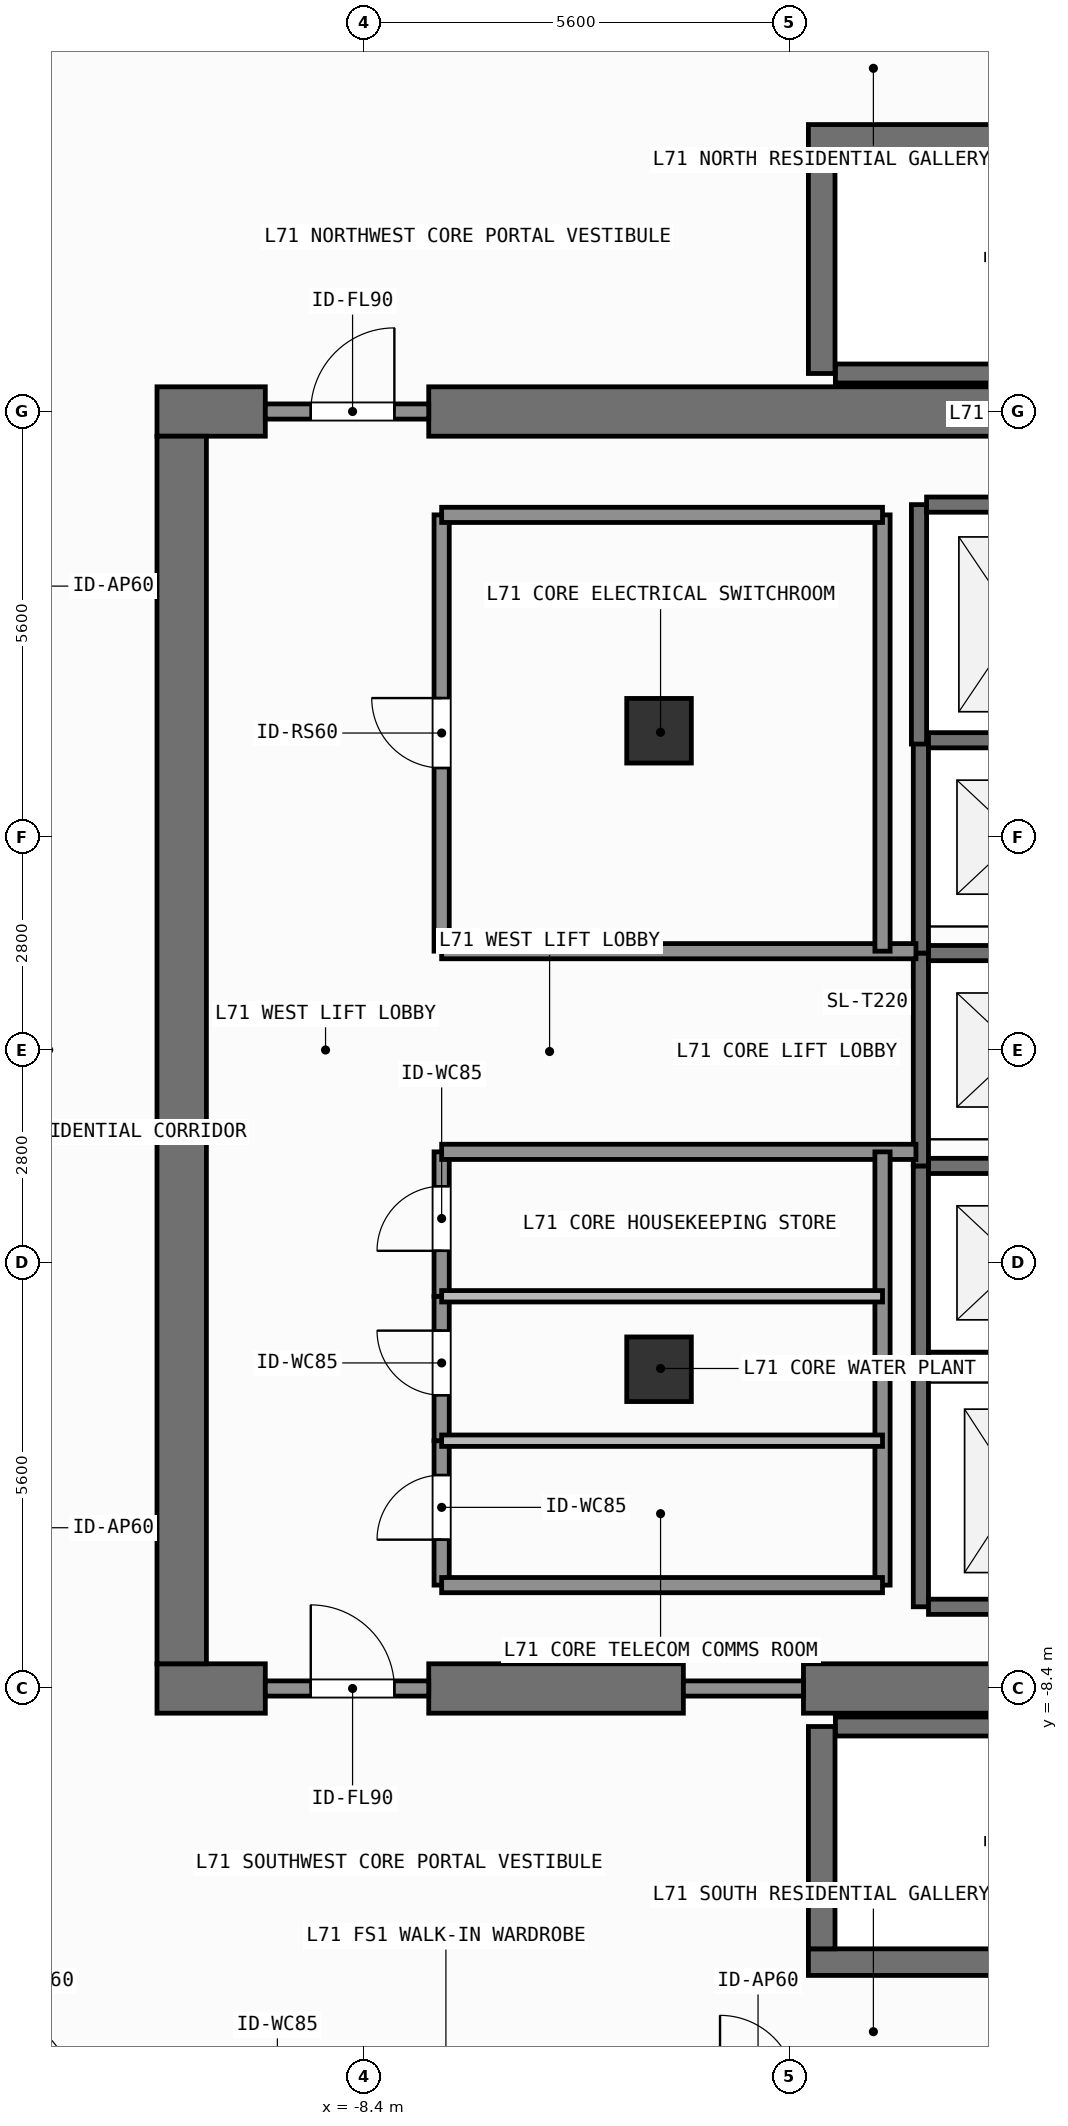
"""IFC4 building model, lengths in metres.
Left out: names, types, materials, properties, quantities, classifications, styles, units other than length and angle.
Written with IfcOpenShell. Run it as: python <this file> out.ifc"""

import sys

from ifc_helpers import new_model, si_unit, direction, frame, frame_2d, origin, origin_2d, place, context, subcontext, project, spatial, rectangle, extrude, element, fill, save


model = new_model("IFC4")
c1 = context("Model", 3, precision=1e-05, world=origin(), true_north=direction((0.0, 1.0)))
c2 = subcontext(c1, "Body", "Model", "MODEL_VIEW")
j1 = project(units=[si_unit("LENGTHUNIT", "METRE"), si_unit("PLANEANGLEUNIT", "RADIAN")], contexts=[c1])
p1 = place(None, origin())
s1 = spatial("IfcSite", under=j1, at=p1, CompositionType="ELEMENT")
p2 = place(p1, origin())
s2 = spatial("IfcBuilding", under=s1, at=p2, CompositionType="ELEMENT")
p3 = place(p2, frame((0.0, 0.0, 289.8)))
s3 = spatial("IfcBuildingStorey", under=s2, at=p3, CompositionType="ELEMENT", Elevation=289.8)
p4 = place(p3, frame((-11.125, -8.4, 0.0), z_axis=(0.0, 0.0, 1.0), x_axis=(1.0, 0.0, 0.0)))
e1 = element("IfcWall", 1, at=p4, inside=s3, PredefinedType="SHEAR", context=c2, shape_type="SweptSolid", body=[
    extrude(rectangle(XDim=1.425, YDim=0.65, at=frame_2d((0.712, 0.0))), origin(), (0.0, 0.0, 1.0), 3.9),
])
p5 = place(p3, frame((-7.55, -8.4, 0.0), z_axis=(0.0, 0.0, 1.0), x_axis=(1.0, 0.0, 0.0)))
e2 = element("IfcWall", 2, at=p5, inside=s3, PredefinedType="SHEAR", context=c2, shape_type="SweptSolid", body=[
    extrude(rectangle(XDim=3.35, YDim=0.65, at=frame_2d((1.675, 0.0))), origin(), (0.0, 0.0, 1.0), 3.9),
])
p6 = place(p3, frame((-2.62, -8.4, 0.0), z_axis=(0.0, 0.0, 1.0), x_axis=(1.0, 0.0, 0.0)))
e3 = element("IfcWall", 3, at=p6, inside=s3, PredefinedType="SHEAR", context=c2, shape_type="SweptSolid", body=[
    extrude(rectangle(XDim=7.27, YDim=0.65, at=frame_2d((3.635, 0.0))), origin(), (0.0, 0.0, 1.0), 3.9),
])
p7 = place(p3, frame((-11.125, 8.4, 0.0), z_axis=(0.0, 0.0, 1.0), x_axis=(1.0, 0.0, 0.0)))
e4 = element("IfcWall", 4, at=p7, inside=s3, PredefinedType="SHEAR", context=c2, shape_type="SweptSolid", body=[
    extrude(rectangle(XDim=1.425, YDim=0.65, at=frame_2d((0.712, 0.0))), origin(), (0.0, 0.0, 1.0), 3.9),
])
p8 = place(p3, frame((-7.55, 8.4, 0.0), z_axis=(0.0, 0.0, 1.0), x_axis=(1.0, 0.0, 0.0)))
e5 = element("IfcWall", 5, at=p8, inside=s3, PredefinedType="SHEAR", context=c2, shape_type="SweptSolid", body=[
    extrude(rectangle(XDim=16.275, YDim=0.65, at=frame_2d((8.138, 0.0))), origin(), (0.0, 0.0, 1.0), 3.9),
])
p9 = place(p3, frame((-10.8, -8.075, 0.0), z_axis=(0.0, 0.0, 1.0), x_axis=(0.0, 1.0, 0.0)))
e6 = element("IfcWall", 6, at=p9, inside=s3, PredefinedType="SHEAR", context=c2, shape_type="SweptSolid", body=[
    extrude(rectangle(XDim=16.15, YDim=0.65, at=frame_2d((8.075, 0.0))), origin(), (0.0, 0.0, 1.0), 3.9),
])
p10 = place(p3, frame((-2.555, -12.0, 0.0), z_axis=(0.0, 0.0, 1.0), x_axis=(1.0, 0.0, 0.0)))
e7 = element("IfcWall", 7, at=p10, inside=s3, PredefinedType="SHEAR", context=c2, shape_type="SweptSolid", body=[
    extrude(rectangle(XDim=7.31, YDim=0.35, at=frame_2d((3.655, 0.0))), origin(), (0.0, 0.0, 1.0), 3.9),
])
p11 = place(p3, frame((-2.2, -8.9, 0.0), z_axis=(0.0, 0.0, 1.0), x_axis=(1.0, 0.0, 0.0)))
e8 = element("IfcWall", 8, at=p11, inside=s3, PredefinedType="SHEAR", context=c2, shape_type="SweptSolid", body=[
    extrude(rectangle(XDim=6.6, YDim=0.25, at=frame_2d((3.3, 0.0))), origin(), (0.0, 0.0, 1.0), 3.9),
])
p12 = place(p3, frame((-2.38, -11.825, 0.0), z_axis=(0.0, 0.0, 1.0), x_axis=(0.0, 1.0, 0.0)))
e9 = element("IfcWall", 9, at=p12, inside=s3, PredefinedType="SHEAR", context=c2, shape_type="SweptSolid", body=[
    extrude(rectangle(XDim=2.925, YDim=0.35, at=frame_2d((1.462, 0.0))), origin(), (0.0, 0.0, 1.0), 3.9),
])
p13 = place(p3, frame((-2.555, 12.0, 0.0), z_axis=(0.0, 0.0, 1.0), x_axis=(1.0, 0.0, 0.0)))
e10 = element("IfcWall", 10, at=p13, inside=s3, PredefinedType="SHEAR", context=c2, shape_type="SweptSolid", body=[
    extrude(rectangle(XDim=7.31, YDim=0.35, at=frame_2d((3.655, 0.0))), origin(), (0.0, 0.0, 1.0), 3.9),
])
p14 = place(p3, frame((-2.2, 8.9, 0.0), z_axis=(0.0, 0.0, 1.0), x_axis=(1.0, 0.0, 0.0)))
e11 = element("IfcWall", 11, at=p14, inside=s3, PredefinedType="SHEAR", context=c2, shape_type="SweptSolid", body=[
    extrude(rectangle(XDim=6.6, YDim=0.25, at=frame_2d((3.3, 0.0))), origin(), (0.0, 0.0, 1.0), 3.9),
])
p15 = place(p3, frame((-2.38, 8.9, 0.0), z_axis=(0.0, 0.0, 1.0), x_axis=(0.0, 1.0, 0.0)))
e12 = element("IfcWall", 12, at=p15, inside=s3, PredefinedType="SHEAR", context=c2, shape_type="SweptSolid", body=[
    extrude(rectangle(XDim=2.925, YDim=0.35, at=frame_2d((1.462, 0.0))), origin(), (0.0, 0.0, 1.0), 3.9),
])
for number, where, z_axis, x_axis in (
    (13, (-4.52, -4.2, 0.0), (0.0, 0.0, 1.0), (1.0, 0.0, 0.0)),
    (14, (-4.52, 4.2, 0.0), (0.0, 0.0, 1.0), (1.0, 0.0, 0.0)),
):
    element("IfcColumn", number, at=place(p3, frame(where, z_axis=z_axis, x_axis=x_axis)), inside=s3, PredefinedType="COLUMN", context=c2, shape_type="SweptSolid", body=[
        extrude(rectangle(XDim=0.85, YDim=0.85, at=origin_2d()), origin(), (0.0, 0.0, 1.0), 3.9),
    ])
p16 = place(p3, frame((-1.075, -4.275, 0.0), z_axis=(0.0, 0.0, 1.0), x_axis=(0.0, 1.0, 0.0)))
e15 = element("IfcWall", 15, at=p16, inside=s3, PredefinedType="SHEAR", context=c2, shape_type="SweptSolid", body=[
    extrude(rectangle(XDim=2.75, YDim=0.2, at=frame_2d((1.375, 0.0))), origin(), (0.0, 0.0, 1.0), 3.68),
])
for number, where, z_axis, x_axis in (
    (16, (-0.975, -4.075, 0.0), (0.0, 0.0, 1.0), (1.0, 0.0, 0.0)),
    (17, (-0.975, -1.525, 0.0), (0.0, 0.0, 1.0), (1.0, 0.0, 0.0)),
):
    element("IfcWall", number, at=place(p3, frame(where, z_axis=z_axis, x_axis=x_axis)), inside=s3, PredefinedType="SHEAR", context=c2, shape_type="SweptSolid", body=[
        extrude(rectangle(XDim=2.35, YDim=0.2, at=frame_2d((1.175, 0.0))), origin(), (0.0, 0.0, 1.0), 3.68),
    ])
p17 = place(p3, frame((-1.075, -1.525, 0.0), z_axis=(0.0, 0.0, 1.0), x_axis=(0.0, 1.0, 0.0)))
e18 = element("IfcWall", 18, at=p17, inside=s3, PredefinedType="SHEAR", context=c2, shape_type="SweptSolid", body=[
    extrude(rectangle(XDim=2.8, YDim=0.2, at=frame_2d((1.4, 0.0))), origin(), (0.0, 0.0, 1.0), 3.68),
])
p18 = place(p3, frame((-0.975, 1.275, 0.0), z_axis=(0.0, 0.0, 1.0), x_axis=(1.0, 0.0, 0.0)))
e19 = element("IfcWall", 19, at=p18, inside=s3, PredefinedType="SHEAR", context=c2, shape_type="SweptSolid", body=[
    extrude(rectangle(XDim=2.35, YDim=0.2, at=frame_2d((1.175, 0.0))), origin(), (0.0, 0.0, 1.0), 3.68),
])
p19 = place(p3, frame((-1.075, 1.275, 0.0), z_axis=(0.0, 0.0, 1.0), x_axis=(0.0, 1.0, 0.0)))
e20 = element("IfcWall", 20, at=p19, inside=s3, PredefinedType="SHEAR", context=c2, shape_type="SweptSolid", body=[
    extrude(rectangle(XDim=2.8, YDim=0.2, at=frame_2d((1.4, 0.0))), origin(), (0.0, 0.0, 1.0), 3.68),
])
p20 = place(p3, frame((-0.975, 4.075, 0.0), z_axis=(0.0, 0.0, 1.0), x_axis=(1.0, 0.0, 0.0)))
e21 = element("IfcWall", 21, at=p20, inside=s3, PredefinedType="SHEAR", context=c2, shape_type="SweptSolid", body=[
    extrude(rectangle(XDim=2.35, YDim=0.2, at=frame_2d((1.175, 0.0))), origin(), (0.0, 0.0, 1.0), 3.68),
])
p21 = place(p3, frame((-1.1, 4.025, 0.0), z_axis=(0.0, 0.0, 1.0), x_axis=(0.0, 1.0, 0.0)))
e22 = element("IfcWall", 22, at=p21, inside=s3, PredefinedType="SHEAR", context=c2, shape_type="SweptSolid", body=[
    extrude(rectangle(XDim=3.15, YDim=0.2, at=frame_2d((1.575, 0.0))), origin(), (0.0, 0.0, 1.0), 3.68),
])
p22 = place(p3, frame((-1.0, 7.175, 0.0), z_axis=(0.0, 0.0, 1.0), x_axis=(1.0, 0.0, 0.0)))
e23 = element("IfcWall", 23, at=p22, inside=s3, PredefinedType="SHEAR", context=c2, shape_type="SweptSolid", body=[
    extrude(rectangle(XDim=2.4, YDim=0.2, at=frame_2d((1.2, 0.0))), origin(), (0.0, 0.0, 1.0), 3.68),
])
p23 = place(p3, frame((-1.075, -7.325, 0.0), z_axis=(0.0, 0.0, 1.0), x_axis=(0.0, 1.0, 0.0)))
e24 = element("IfcWall", 24, at=p23, inside=s3, PredefinedType="SHEAR", context=c2, shape_type="SweptSolid", body=[
    extrude(rectangle(XDim=3.05, YDim=0.2, at=frame_2d((1.525, 0.0))), origin(), (0.0, 0.0, 1.0), 3.68),
])
p24 = place(p3, frame((-0.975, -7.325, 0.0), z_axis=(0.0, 0.0, 1.0), x_axis=(1.0, 0.0, 0.0)))
e25 = element("IfcWall", 25, at=p24, inside=s3, PredefinedType="SHEAR", context=c2, shape_type="SweptSolid", body=[
    extrude(rectangle(XDim=2.35, YDim=0.2, at=frame_2d((1.175, 0.0))), origin(), (0.0, 0.0, 1.0), 3.68),
])
p25 = place(p3, frame((-9.7, -8.4, 0.0), z_axis=(0.0, 0.0, 1.0), x_axis=(1.0, 0.0, 0.0)))
e26 = element("IfcWall", 26, at=p25, inside=s3, PredefinedType="SOLIDWALL", context=c2, shape_type="SweptSolid", body=[
    extrude(rectangle(XDim=2.15, YDim=0.2, at=frame_2d((1.075, 0.0))), origin(), (0.0, 0.0, 1.0), 2.92),
])
p26 = place(p25, frame((0.598, 0.0, 0.0)))
e27 = element("IfcOpeningElement", 27, at=p26, cuts=e26, PredefinedType="OPENING", context=c2, shape_type="SweptSolid", body=[
    extrude(rectangle(XDim=1.1, YDim=2.15, at=frame_2d((0.55, 1.075))), frame((0.0, 0.11, 0.0), z_axis=(0.0, -1.0, 0.0), x_axis=(1.0, 0.0, 0.0)), (0.0, 0.0, 1.0), 0.22),
])
p27 = place(p3, frame((-9.7, 8.4, 0.0), z_axis=(0.0, 0.0, 1.0), x_axis=(1.0, 0.0, 0.0)))
e28 = element("IfcWall", 28, at=p27, inside=s3, PredefinedType="SOLIDWALL", context=c2, shape_type="SweptSolid", body=[
    extrude(rectangle(XDim=2.15, YDim=0.2, at=frame_2d((1.075, 0.0))), origin(), (0.0, 0.0, 1.0), 2.92),
])
p28 = place(p27, frame((0.598, 0.0, 0.0)))
e29 = element("IfcOpeningElement", 29, at=p28, cuts=e28, PredefinedType="OPENING", context=c2, shape_type="SweptSolid", body=[
    extrude(rectangle(XDim=1.1, YDim=2.15, at=frame_2d((0.55, 1.075))), frame((0.0, 0.11, 0.0), z_axis=(0.0, -1.0, 0.0), x_axis=(1.0, 0.0, 0.0)), (0.0, 0.0, 1.0), 0.22),
])
p29 = place(p3, frame((-7.38, -7.04, 0.0), z_axis=(0.0, 0.0, 1.0), x_axis=(0.0, 1.0, 0.0)))
e30 = element("IfcWall", 30, at=p29, inside=s3, PredefinedType="SOLIDWALL", context=c2, shape_type="SweptSolid", body=[
    extrude(rectangle(XDim=1.9, YDim=0.2, at=frame_2d((0.95, 0.0))), origin(), (0.0, 0.0, 1.0), 3.68),
])
p30 = place(p29, frame((0.598, 0.0, 0.0)))
e31 = element("IfcOpeningElement", 31, at=p30, cuts=e30, PredefinedType="OPENING", context=c2, shape_type="SweptSolid", body=[
    extrude(rectangle(XDim=0.85, YDim=2.1, at=frame_2d((0.425, 1.05))), frame((0.0, 0.11, 0.0), z_axis=(0.0, -1.0, 0.0), x_axis=(1.0, 0.0, 0.0)), (0.0, 0.0, 1.0), 0.22),
])
p31 = place(p3, frame((-7.38, -5.14, 0.0), z_axis=(0.0, 0.0, 1.0), x_axis=(0.0, 1.0, 0.0)))
e32 = element("IfcWall", 32, at=p31, inside=s3, PredefinedType="SOLIDWALL", context=c2, shape_type="SweptSolid", body=[
    extrude(rectangle(XDim=1.9, YDim=0.2, at=frame_2d((0.95, 0.0))), origin(), (0.0, 0.0, 1.0), 3.68),
])
p32 = place(p31, frame((0.598, 0.0, 0.0)))
e33 = element("IfcOpeningElement", 33, at=p32, cuts=e32, PredefinedType="OPENING", context=c2, shape_type="SweptSolid", body=[
    extrude(rectangle(XDim=0.85, YDim=2.1, at=frame_2d((0.425, 1.05))), frame((0.0, 0.11, 0.0), z_axis=(0.0, -1.0, 0.0), x_axis=(1.0, 0.0, 0.0)), (0.0, 0.0, 1.0), 0.22),
])
p33 = place(p3, frame((-7.38, -3.24, 0.0), z_axis=(0.0, 0.0, 1.0), x_axis=(0.0, 1.0, 0.0)))
e34 = element("IfcWall", 34, at=p33, inside=s3, PredefinedType="SOLIDWALL", context=c2, shape_type="SweptSolid", body=[
    extrude(rectangle(XDim=1.9, YDim=0.2, at=frame_2d((0.95, 0.0))), origin(), (0.0, 0.0, 1.0), 3.68),
])
p34 = place(p33, frame((0.598, 0.0, 0.0)))
e35 = element("IfcOpeningElement", 35, at=p34, cuts=e34, PredefinedType="OPENING", context=c2, shape_type="SweptSolid", body=[
    extrude(rectangle(XDim=0.85, YDim=2.1, at=frame_2d((0.425, 1.05))), frame((0.0, 0.11, 0.0), z_axis=(0.0, -1.0, 0.0), x_axis=(1.0, 0.0, 0.0)), (0.0, 0.0, 1.0), 0.22),
])
p35 = place(p3, frame((-7.38, 1.3, 0.0), z_axis=(0.0, 0.0, 1.0), x_axis=(0.0, 1.0, 0.0)))
e36 = element("IfcWall", 36, at=p35, inside=s3, PredefinedType="SOLIDWALL", context=c2, shape_type="SweptSolid", body=[
    extrude(rectangle(XDim=5.74, YDim=0.2, at=frame_2d((2.87, 0.0))), origin(), (0.0, 0.0, 1.0), 3.68),
])
p36 = place(p35, frame((2.41, 0.0, 0.0)))
e37 = element("IfcOpeningElement", 37, at=p36, cuts=e36, PredefinedType="OPENING", context=c2, shape_type="SweptSolid", body=[
    extrude(rectangle(XDim=0.92, YDim=2.1, at=frame_2d((0.46, 1.05))), frame((0.0, 0.11, 0.0), z_axis=(0.0, -1.0, 0.0), x_axis=(1.0, 0.0, 0.0)), (0.0, 0.0, 1.0), 0.22),
])
p37 = place(p3, frame((-4.2, -8.4, 0.0), z_axis=(0.0, 0.0, 1.0), x_axis=(1.0, 0.0, 0.0)))
e38 = element("IfcWall", 38, at=p37, inside=s3, PredefinedType="SOLIDWALL", context=c2, shape_type="SweptSolid", body=[
    extrude(rectangle(XDim=1.58, YDim=0.2, at=frame_2d((0.79, 0.0))), origin(), (0.0, 0.0, 1.0), 2.92),
])
for number, where, z_axis, x_axis in (
    (39, (-7.38, -1.34, 0.0), (0.0, 0.0, 1.0), (1.0, 0.0, 0.0)),
    (40, (-7.38, 1.3, 0.0), (0.0, 0.0, 1.0), (1.0, 0.0, 0.0)),
):
    element("IfcWall", number, at=place(p3, frame(where, z_axis=z_axis, x_axis=x_axis)), inside=s3, PredefinedType="SOLIDWALL", context=c2, shape_type="SweptSolid", body=[
        extrude(rectangle(XDim=6.24, YDim=0.2, at=frame_2d((3.12, 0.0))), origin(), (0.0, 0.0, 1.0), 3.68),
    ])
p38 = place(p3, frame((-1.58, -7.04, 0.0), z_axis=(0.0, 0.0, 1.0), x_axis=(0.0, 1.0, 0.0)))
e41 = element("IfcWall", 41, at=p38, inside=s3, PredefinedType="SOLIDWALL", context=c2, shape_type="SweptSolid", body=[
    extrude(rectangle(XDim=5.7, YDim=0.2, at=frame_2d((2.85, 0.0))), origin(), (0.0, 0.0, 1.0), 3.68),
])
p39 = place(p3, frame((-7.38, -7.04, 0.0), z_axis=(0.0, 0.0, 1.0), x_axis=(1.0, 0.0, 0.0)))
e42 = element("IfcWall", 42, at=p39, inside=s3, PredefinedType="SOLIDWALL", context=c2, shape_type="SweptSolid", body=[
    extrude(rectangle(XDim=5.8, YDim=0.2, at=frame_2d((2.9, 0.0))), origin(), (0.0, 0.0, 1.0), 3.68),
])
p40 = place(p3, frame((-1.58, 1.3, 0.0), z_axis=(0.0, 0.0, 1.0), x_axis=(0.0, 1.0, 0.0)))
e43 = element("IfcWall", 43, at=p40, inside=s3, PredefinedType="SOLIDWALL", context=c2, shape_type="SweptSolid", body=[
    extrude(rectangle(XDim=5.74, YDim=0.2, at=frame_2d((2.87, 0.0))), origin(), (0.0, 0.0, 1.0), 3.68),
])
p41 = place(p3, frame((-7.38, 7.04, 0.0), z_axis=(0.0, 0.0, 1.0), x_axis=(1.0, 0.0, 0.0)))
e44 = element("IfcWall", 44, at=p41, inside=s3, PredefinedType="SOLIDWALL", context=c2, shape_type="SweptSolid", body=[
    extrude(rectangle(XDim=5.8, YDim=0.2, at=frame_2d((2.9, 0.0))), origin(), (0.0, 0.0, 1.0), 3.68),
])
for number, where, z_axis, x_axis in (
    (45, (-7.38, -5.14, 0.0), (0.0, 0.0, 1.0), (1.0, 0.0, 0.0)),
    (46, (-7.38, -3.24, 0.0), (0.0, 0.0, 1.0), (1.0, 0.0, 0.0)),
):
    element("IfcWall", number, at=place(p3, frame(where, z_axis=z_axis, x_axis=x_axis)), inside=s3, PredefinedType="PARTITIONING", context=c2, shape_type="SweptSolid", body=[
        extrude(rectangle(XDim=5.8, YDim=0.15, at=frame_2d((2.9, 0.0))), origin(), (0.0, 0.0, 1.0), 3.68),
    ])
p42 = place(p26, origin())
e47 = element("IfcDoor", 47, at=p42, inside=s3, OperationType="SINGLE_SWING_LEFT", PredefinedType="DOOR", context=c2, shape_type="SweptSolid", body=[
    extrude(rectangle(XDim=1.1, YDim=2.15, at=frame_2d((0.55, 1.075))), frame((0.0, 0.025, 0.0), z_axis=(0.0, -1.0, 0.0), x_axis=(1.0, 0.0, 0.0)), (0.0, 0.0, 1.0), 0.05),
])
fill(e27, e47)
p43 = place(p28, origin())
e48 = element("IfcDoor", 48, at=p43, inside=s3, OperationType="SINGLE_SWING_RIGHT", PredefinedType="DOOR", context=c2, shape_type="SweptSolid", body=[
    extrude(rectangle(XDim=1.1, YDim=2.15, at=frame_2d((0.55, 1.075))), frame((0.0, 0.025, 0.0), z_axis=(0.0, -1.0, 0.0), x_axis=(1.0, 0.0, 0.0)), (0.0, 0.0, 1.0), 0.05),
])
fill(e29, e48)
p44 = place(p30, origin())
e49 = element("IfcDoor", 49, at=p44, inside=s3, OperationType="SINGLE_SWING_LEFT", PredefinedType="DOOR", context=c2, shape_type="SweptSolid", body=[
    extrude(rectangle(XDim=0.85, YDim=2.1, at=frame_2d((0.425, 1.05))), frame((0.0, 0.025, 0.0), z_axis=(0.0, -1.0, 0.0), x_axis=(1.0, 0.0, 0.0)), (0.0, 0.0, 1.0), 0.05),
])
fill(e31, e49)
p45 = place(p32, origin())
e50 = element("IfcDoor", 50, at=p45, inside=s3, OperationType="SINGLE_SWING_RIGHT", PredefinedType="DOOR", context=c2, shape_type="SweptSolid", body=[
    extrude(rectangle(XDim=0.85, YDim=2.1, at=frame_2d((0.425, 1.05))), frame((0.0, 0.025, 0.0), z_axis=(0.0, -1.0, 0.0), x_axis=(1.0, 0.0, 0.0)), (0.0, 0.0, 1.0), 0.05),
])
fill(e33, e50)
p46 = place(p34, origin())
e51 = element("IfcDoor", 51, at=p46, inside=s3, OperationType="SINGLE_SWING_LEFT", PredefinedType="DOOR", context=c2, shape_type="SweptSolid", body=[
    extrude(rectangle(XDim=0.85, YDim=2.1, at=frame_2d((0.425, 1.05))), frame((0.0, 0.025, 0.0), z_axis=(0.0, -1.0, 0.0), x_axis=(1.0, 0.0, 0.0)), (0.0, 0.0, 1.0), 0.05),
])
fill(e35, e51)
p47 = place(p36, origin())
e52 = element("IfcDoor", 52, at=p47, inside=s3, OperationType="SINGLE_SWING_RIGHT", PredefinedType="DOOR", context=c2, shape_type="SweptSolid", body=[
    extrude(rectangle(XDim=0.92, YDim=2.1, at=frame_2d((0.46, 1.05))), frame((0.0, 0.025, 0.0), z_axis=(0.0, -1.0, 0.0), x_axis=(1.0, 0.0, 0.0)), (0.0, 0.0, 1.0), 0.05),
])
fill(e37, e52)
save(model, sys.argv[1])
